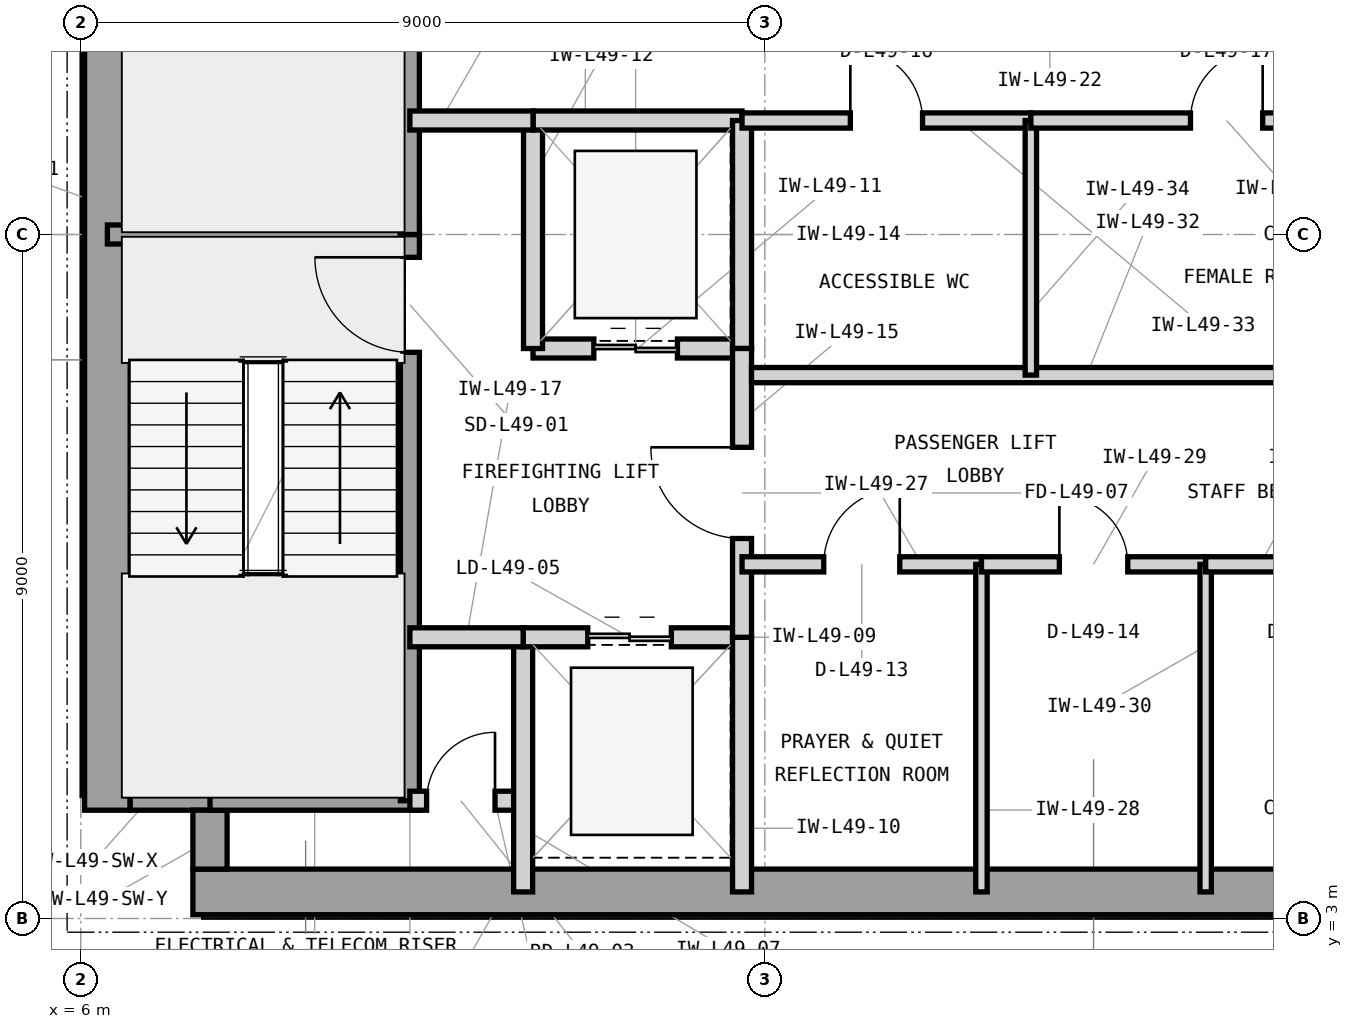
"""IFC4 building model, lengths in metres.
Left out: names, types, materials, properties, quantities, classifications, styles, units other than length and angle.
Written with IfcOpenShell. Run it as: python <this file> out.ifc"""

import sys

from ifc_helpers import new_model, si_unit, direction, frame, frame_2d, origin, place, context, subcontext, project, spatial, rectangle, extrude, element, fill, save


model = new_model("IFC4")
c1 = context("Model", 3, precision=1e-05, world=origin(), true_north=direction((0.0, 1.0)))
c2 = subcontext(c1, "Body", "Model", "MODEL_VIEW")
j1 = project(units=[si_unit("LENGTHUNIT", "METRE"), si_unit("PLANEANGLEUNIT", "RADIAN")], contexts=[c1])
p1 = place(None, origin())
s1 = spatial("IfcSite", under=j1, at=p1, CompositionType="ELEMENT")
p2 = place(p1, origin())
s2 = spatial("IfcBuilding", under=s1, at=p2, CompositionType="ELEMENT")
p3 = place(p2, frame((0.0, 0.0, 203.4)))
s3 = spatial("IfcBuildingStorey", under=s2, at=p3, CompositionType="ELEMENT", Elevation=203.4)
p4 = place(p3, frame((7.475, 3.35, 0.0), z_axis=(0.0, 0.0, 1.0), x_axis=(1.0, 0.0, 0.0)))
e1 = element("IfcWall", 1, at=p4, inside=s3, PredefinedType="SHEAR", context=c2, shape_type="SweptSolid", body=[
    extrude(rectangle(XDim=16.475, YDim=0.6, at=frame_2d((8.237, 0.0))), origin(), (0.0, 0.0, 1.0), 3.9),
])
p5 = place(p3, frame((6.35, 4.425, 0.0), z_axis=(0.0, 0.0, 1.0), x_axis=(0.0, 1.0, 0.0)))
e2 = element("IfcWall", 2, at=p5, inside=s3, PredefinedType="SHEAR", context=c2, shape_type="SweptSolid", body=[
    extrude(rectangle(XDim=15.15, YDim=0.6, at=frame_2d((7.575, 0.0))), origin(), (0.0, 0.0, 1.0), 3.9),
])
p6 = place(p3, frame((6.65, 4.65, 0.0), z_axis=(0.0, 0.0, 1.0), x_axis=(1.0, 0.0, 0.0)))
e3 = element("IfcWall", 3, at=p6, inside=s3, PredefinedType="SHEAR", context=c2, shape_type="SweptSolid", body=[
    extrude(rectangle(XDim=1.275, YDim=0.45, at=frame_2d((0.638, 0.0))), origin(), (0.0, 0.0, 1.0), 3.9),
])
p7 = place(p3, frame((7.7, 3.65, 0.0), z_axis=(0.0, 0.0, 1.0), x_axis=(0.0, 1.0, 0.0)))
e4 = element("IfcWall", 4, at=p7, inside=s3, PredefinedType="SHEAR", context=c2, shape_type="SweptSolid", body=[
    extrude(rectangle(XDim=0.775, YDim=0.45, at=frame_2d((0.388, 0.0))), origin(), (0.0, 0.0, 1.0), 3.9),
])
p8 = place(p3, frame((6.35, 12.0, 0.0), z_axis=(0.0, 0.0, 1.0), x_axis=(1.0, 0.0, 0.0)))
e5 = element("IfcWall", 5, at=p8, inside=s3, PredefinedType="SHEAR", context=c2, shape_type="SweptSolid", body=[
    extrude(rectangle(XDim=4.105, YDim=0.25, at=frame_2d((2.052, 0.0))), origin(), (0.0, 0.0, 1.0), 3.9),
])
p9 = place(p3, frame((7.7, 4.55, 0.0), z_axis=(0.0, 0.0, 1.0), x_axis=(1.0, 0.0, 0.0)))
e6 = element("IfcWall", 6, at=p9, inside=s3, PredefinedType="SHEAR", context=c2, shape_type="SweptSolid", body=[
    extrude(rectangle(XDim=2.755, YDim=0.25, at=frame_2d((1.377, 0.0))), origin(), (0.0, 0.0, 1.0), 3.9),
])
p10 = place(p3, frame((10.33, 4.55, 0.0), z_axis=(0.0, 0.0, 1.0), x_axis=(0.0, 1.0, 0.0)))
e7 = element("IfcWall", 7, at=p10, inside=s3, PredefinedType="SHEAR", context=c2, shape_type="SweptSolid", body=[
    extrude(rectangle(XDim=7.45, YDim=0.25, at=frame_2d((3.725, 0.0))), origin(), (0.0, 0.0, 1.0), 3.9),
])
p11 = place(p10, frame((5.9, 0.0, 0.0)))
e8 = element("IfcOpeningElement", 8, at=p11, cuts=e7, PredefinedType="OPENING", context=c2, shape_type="SweptSolid", body=[
    extrude(rectangle(XDim=1.25, YDim=2.2, at=frame_2d((0.625, 1.1))), frame((0.0, 0.135, 0.0), z_axis=(0.0, -1.0, 0.0), x_axis=(1.0, 0.0, 0.0)), (0.0, 0.0, 1.0), 0.27),
])
p12 = place(p3, frame((10.33, 12.0, 0.0), z_axis=(0.0, 0.0, 1.0), x_axis=(0.0, 1.0, 0.0)))
e9 = element("IfcWall", 9, at=p12, inside=s3, PredefinedType="SHEAR", context=c2, shape_type="SweptSolid", body=[
    extrude(rectangle(XDim=7.45, YDim=0.25, at=frame_2d((3.725, 0.0))), origin(), (0.0, 0.0, 1.0), 3.9),
])
p13 = place(p12, frame((5.85, 0.0, 0.0)))
e10 = element("IfcOpeningElement", 10, at=p13, cuts=e9, PredefinedType="OPENING", context=c2, shape_type="SweptSolid", body=[
    extrude(rectangle(XDim=1.25, YDim=2.2, at=frame_2d((0.625, 1.1))), frame((0.0, 0.135, 0.0), z_axis=(0.0, -1.0, 0.0), x_axis=(1.0, 0.0, 0.0)), (0.0, 0.0, 1.0), 0.27),
])
p14 = place(p3, frame((10.33, 4.55, 0.0), z_axis=(0.0, 0.0, 1.0), x_axis=(1.0, 0.0, 0.0)))
e11 = element("IfcWall", 11, at=p14, inside=s3, PredefinedType="PARTITIONING", context=c2, shape_type="SweptSolid", body=[
    extrude(rectangle(XDim=1.49, YDim=0.25, at=frame_2d((0.745, 0.0))), origin(), (0.0, 0.0, 1.0), 3.69),
])
p15 = place(p14, frame((0.22, 0.0, 0.0)))
e12 = element("IfcOpeningElement", 12, at=p15, cuts=e11, PredefinedType="OPENING", context=c2, shape_type="SweptSolid", body=[
    extrude(rectangle(XDim=0.9, YDim=2.1, at=frame_2d((0.45, 1.05))), frame((0.0, 0.135, 0.0), z_axis=(0.0, -1.0, 0.0), x_axis=(1.0, 0.0, 0.0)), (0.0, 0.0, 1.0), 0.27),
])
p16 = place(p3, frame((11.82, 3.35, 0.0), z_axis=(0.0, 0.0, 1.0), x_axis=(0.0, 1.0, 0.0)))
e13 = element("IfcWall", 13, at=p16, inside=s3, PredefinedType="PARTITIONING", context=c2, shape_type="SweptSolid", body=[
    extrude(rectangle(XDim=3.35, YDim=0.25, at=frame_2d((1.675, 0.0))), origin(), (0.0, 0.0, 1.0), 3.69),
])
p17 = place(p3, frame((11.82, 6.7, 0.0), z_axis=(0.0, 0.0, 1.0), x_axis=(1.0, 0.0, 0.0)))
e14 = element("IfcWall", 14, at=p17, inside=s3, PredefinedType="PARTITIONING", context=c2, shape_type="SweptSolid", body=[
    extrude(rectangle(XDim=2.88, YDim=0.25, at=frame_2d((1.44, 0.0))), origin(), (0.0, 0.0, 1.0), 3.283),
])
p18 = place(p17, frame((0.85, 0.0, 0.0)))
e15 = element("IfcOpeningElement", 15, at=p18, cuts=e14, PredefinedType="OPENING", context=c2, shape_type="SweptSolid", body=[
    extrude(rectangle(XDim=1.1, YDim=2.25, at=frame_2d((0.55, 1.125))), frame((0.0, 0.135, 0.0), z_axis=(0.0, -1.0, 0.0), x_axis=(1.0, 0.0, 0.0)), (0.0, 0.0, 1.0), 0.27),
])
p19 = place(p3, frame((14.7, 3.35, 0.0), z_axis=(0.0, 0.0, 1.0), x_axis=(0.0, 1.0, 0.0)))
e16 = element("IfcWall", 16, at=p19, inside=s3, PredefinedType="PARTITIONING", context=c2, shape_type="SweptSolid", body=[
    extrude(rectangle(XDim=3.35, YDim=0.25, at=frame_2d((1.675, 0.0))), origin(), (0.0, 0.0, 1.0), 3.69),
])
p20 = place(p3, frame((11.95, 10.5, 0.0), z_axis=(0.0, 0.0, 1.0), x_axis=(1.0, 0.0, 0.0)))
e17 = element("IfcWall", 17, at=p20, inside=s3, PredefinedType="PARTITIONING", context=c2, shape_type="SweptSolid", body=[
    extrude(rectangle(XDim=2.75, YDim=0.25, at=frame_2d((1.375, 0.0))), origin(), (0.0, 0.0, 1.0), 3.283),
])
p21 = place(p20, frame((0.8, 0.0, 0.0)))
e18 = element("IfcOpeningElement", 18, at=p21, cuts=e17, PredefinedType="OPENING", context=c2, shape_type="SweptSolid", body=[
    extrude(rectangle(XDim=1.1, YDim=2.25, at=frame_2d((0.55, 1.125))), frame((0.0, 0.135, 0.0), z_axis=(0.0, -1.0, 0.0), x_axis=(1.0, 0.0, 0.0)), (0.0, 0.0, 1.0), 0.27),
])
p22 = place(p3, frame((11.95, 10.5, 0.0), z_axis=(0.0, 0.0, 1.0), x_axis=(0.0, 1.0, 0.0)))
e19 = element("IfcWall", 19, at=p22, inside=s3, PredefinedType="PARTITIONING", context=c2, shape_type="SweptSolid", body=[
    extrude(rectangle(XDim=3.0, YDim=0.25, at=frame_2d((1.5, 0.0))), origin(), (0.0, 0.0, 1.0), 3.69),
])
p23 = place(p3, frame((11.95, 13.5, 0.0), z_axis=(0.0, 0.0, 1.0), x_axis=(1.0, 0.0, 0.0)))
e20 = element("IfcWall", 20, at=p23, inside=s3, PredefinedType="PARTITIONING", context=c2, shape_type="SweptSolid", body=[
    extrude(rectangle(XDim=2.75, YDim=0.25, at=frame_2d((1.375, 0.0))), origin(), (0.0, 0.0, 1.0), 3.283),
])
p24 = place(p3, frame((14.7, 10.5, 0.0), z_axis=(0.0, 0.0, 1.0), x_axis=(0.0, 1.0, 0.0)))
e21 = element("IfcWall", 21, at=p24, inside=s3, PredefinedType="PARTITIONING", context=c2, shape_type="SweptSolid", body=[
    extrude(rectangle(XDim=3.0, YDim=0.25, at=frame_2d((1.5, 0.0))), origin(), (0.0, 0.0, 1.0), 3.69),
])
p25 = place(p3, frame((14.7, 6.7, 0.0), z_axis=(0.0, 0.0, 1.0), x_axis=(0.0, 1.0, 0.0)))
e22 = element("IfcWall", 22, at=p25, inside=s3, PredefinedType="PARTITIONING", context=c2, shape_type="SweptSolid", body=[
    extrude(rectangle(XDim=3.8, YDim=0.25, at=frame_2d((1.9, 0.0))), origin(), (0.0, 0.0, 1.0), 3.69),
])
p26 = place(p25, frame((1.3, 0.0, 0.0)))
e23 = element("IfcOpeningElement", 23, at=p26, cuts=e22, PredefinedType="OPENING", context=c2, shape_type="SweptSolid", body=[
    extrude(rectangle(XDim=1.2, YDim=2.2, at=frame_2d((0.6, 1.1))), frame((0.0, 0.135, 0.0), z_axis=(0.0, -1.0, 0.0), x_axis=(1.0, 0.0, 0.0)), (0.0, 0.0, 1.0), 0.27),
])
p27 = place(p3, frame((10.33, 13.5, 0.0), z_axis=(0.0, 0.0, 1.0), x_axis=(1.0, 0.0, 0.0)))
e24 = element("IfcWall", 24, at=p27, inside=s3, PredefinedType="PARTITIONING", context=c2, shape_type="SweptSolid", body=[
    extrude(rectangle(XDim=1.62, YDim=0.25, at=frame_2d((0.81, 0.0))), origin(), (0.0, 0.0, 1.0), 3.283),
])
p28 = place(p3, frame((10.33, 6.7, 0.0), z_axis=(0.0, 0.0, 1.0), x_axis=(1.0, 0.0, 0.0)))
e25 = element("IfcWall", 25, at=p28, inside=s3, PredefinedType="PARTITIONING", context=c2, shape_type="SweptSolid", body=[
    extrude(rectangle(XDim=1.49, YDim=0.25, at=frame_2d((0.745, 0.0))), origin(), (0.0, 0.0, 1.0), 3.283),
])
p29 = place(p3, frame((14.7, 7.66, 0.0), z_axis=(0.0, 0.0, 1.0), x_axis=(1.0, 0.0, 0.0)))
e26 = element("IfcWall", 26, at=p29, inside=s3, PredefinedType="PARTITIONING", context=c2, shape_type="SweptSolid", body=[
    extrude(rectangle(XDim=3.15, YDim=0.2, at=frame_2d((1.575, 0.0))), origin(), (0.0, 0.0, 1.0), 3.69),
])
p30 = place(p29, frame((1.075, 0.0, 0.0)))
e27 = element("IfcOpeningElement", 27, at=p30, cuts=e26, PredefinedType="OPENING", context=c2, shape_type="SweptSolid", body=[
    extrude(rectangle(XDim=1.0, YDim=2.15, at=frame_2d((0.5, 1.075))), frame((0.0, 0.11, 0.0), z_axis=(0.0, -1.0, 0.0), x_axis=(1.0, 0.0, 0.0)), (0.0, 0.0, 1.0), 0.22),
])
p31 = place(p3, frame((17.85, 3.35, 0.0), z_axis=(0.0, 0.0, 1.0), x_axis=(0.0, 1.0, 0.0)))
e28 = element("IfcWall", 28, at=p31, inside=s3, PredefinedType="PARTITIONING", context=c2, shape_type="SweptSolid", body=[
    extrude(rectangle(XDim=4.31, YDim=0.15, at=frame_2d((2.155, 0.0))), origin(), (0.0, 0.0, 1.0), 3.69),
])
p32 = place(p3, frame((17.85, 7.66, 0.0), z_axis=(0.0, 0.0, 1.0), x_axis=(1.0, 0.0, 0.0)))
e29 = element("IfcWall", 29, at=p32, inside=s3, PredefinedType="PARTITIONING", context=c2, shape_type="SweptSolid", body=[
    extrude(rectangle(XDim=2.95, YDim=0.2, at=frame_2d((1.475, 0.0))), origin(), (0.0, 0.0, 1.0), 3.69),
])
p33 = place(p32, frame((1.025, 0.0, 0.0)))
e30 = element("IfcOpeningElement", 30, at=p33, cuts=e29, PredefinedType="OPENING", context=c2, shape_type="SweptSolid", body=[
    extrude(rectangle(XDim=0.9, YDim=2.1, at=frame_2d((0.45, 1.05))), frame((0.0, 0.11, 0.0), z_axis=(0.0, -1.0, 0.0), x_axis=(1.0, 0.0, 0.0)), (0.0, 0.0, 1.0), 0.22),
])
p34 = place(p3, frame((20.8, 3.35, 0.0), z_axis=(0.0, 0.0, 1.0), x_axis=(0.0, 1.0, 0.0)))
e31 = element("IfcWall", 31, at=p34, inside=s3, PredefinedType="PARTITIONING", context=c2, shape_type="SweptSolid", body=[
    extrude(rectangle(XDim=4.31, YDim=0.15, at=frame_2d((2.155, 0.0))), origin(), (0.0, 0.0, 1.0), 3.69),
])
p35 = place(p3, frame((20.8, 7.66, 0.0), z_axis=(0.0, 0.0, 1.0), x_axis=(1.0, 0.0, 0.0)))
e32 = element("IfcWall", 32, at=p35, inside=s3, PredefinedType="PARTITIONING", context=c2, shape_type="SweptSolid", body=[
    extrude(rectangle(XDim=2.85, YDim=0.2, at=frame_2d((1.425, 0.0))), origin(), (0.0, 0.0, 1.0), 3.69),
])
p36 = place(p35, frame((0.95, 0.0, 0.0)))
e33 = element("IfcOpeningElement", 33, at=p36, cuts=e32, PredefinedType="OPENING", context=c2, shape_type="SweptSolid", body=[
    extrude(rectangle(XDim=0.95, YDim=2.1, at=frame_2d((0.475, 1.05))), frame((0.0, 0.11, 0.0), z_axis=(0.0, -1.0, 0.0), x_axis=(1.0, 0.0, 0.0)), (0.0, 0.0, 1.0), 0.22),
])
p37 = place(p3, frame((14.825, 10.15, 0.0), z_axis=(0.0, 0.0, 1.0), x_axis=(1.0, 0.0, 0.0)))
e34 = element("IfcWall", 34, at=p37, inside=s3, PredefinedType="PARTITIONING", context=c2, shape_type="SweptSolid", body=[
    extrude(rectangle(XDim=8.825, YDim=0.2, at=frame_2d((4.413, 0.0))), origin(), (0.0, 0.0, 1.0), 3.69),
])
p38 = place(p3, frame((14.7, 13.5, 0.0), z_axis=(0.0, 0.0, 1.0), x_axis=(1.0, 0.0, 0.0)))
e35 = element("IfcWall", 35, at=p38, inside=s3, PredefinedType="PARTITIONING", context=c2, shape_type="SweptSolid", body=[
    extrude(rectangle(XDim=3.8, YDim=0.2, at=frame_2d((1.9, 0.0))), origin(), (0.0, 0.0, 1.0), 3.283),
])
p39 = place(p38, frame((1.425, 0.0, 0.0)))
e36 = element("IfcOpeningElement", 36, at=p39, cuts=e35, PredefinedType="OPENING", context=c2, shape_type="SweptSolid", body=[
    extrude(rectangle(XDim=0.95, YDim=2.1, at=frame_2d((0.475, 1.05))), frame((0.0, 0.11, 0.0), z_axis=(0.0, -1.0, 0.0), x_axis=(1.0, 0.0, 0.0)), (0.0, 0.0, 1.0), 0.22),
])
p40 = place(p3, frame((18.5, 10.15, 0.0), z_axis=(0.0, 0.0, 1.0), x_axis=(0.0, 1.0, 0.0)))
e37 = element("IfcWall", 37, at=p40, inside=s3, PredefinedType="PARTITIONING", context=c2, shape_type="SweptSolid", body=[
    extrude(rectangle(XDim=3.35, YDim=0.15, at=frame_2d((1.675, 0.0))), origin(), (0.0, 0.0, 1.0), 3.69),
])
p41 = place(p3, frame((18.5, 13.5, 0.0), z_axis=(0.0, 0.0, 1.0), x_axis=(1.0, 0.0, 0.0)))
e38 = element("IfcWall", 38, at=p41, inside=s3, PredefinedType="PARTITIONING", context=c2, shape_type="SweptSolid", body=[
    extrude(rectangle(XDim=5.15, YDim=0.2, at=frame_2d((2.575, 0.0))), origin(), (0.0, 0.0, 1.0), 3.283),
])
p42 = place(p41, frame((2.1, 0.0, 0.0)))
e39 = element("IfcOpeningElement", 39, at=p42, cuts=e38, PredefinedType="OPENING", context=c2, shape_type="SweptSolid", body=[
    extrude(rectangle(XDim=0.95, YDim=2.1, at=frame_2d((0.475, 1.05))), frame((0.0, 0.11, 0.0), z_axis=(0.0, -1.0, 0.0), x_axis=(1.0, 0.0, 0.0)), (0.0, 0.0, 1.0), 0.22),
])
p43 = place(p11, origin())
e40 = element("IfcDoor", 40, at=p43, inside=s3, OperationType="SINGLE_SWING_RIGHT", PredefinedType="DOOR", context=c2, shape_type="SweptSolid", body=[
    extrude(rectangle(XDim=1.25, YDim=2.2, at=frame_2d((0.625, 1.1))), frame((0.0, 0.025, 0.0), z_axis=(0.0, -1.0, 0.0), x_axis=(1.0, 0.0, 0.0)), (0.0, 0.0, 1.0), 0.05),
])
fill(e8, e40)
p44 = place(p15, origin())
e41 = element("IfcDoor", 41, at=p44, inside=s3, OperationType="SINGLE_SWING_RIGHT", PredefinedType="TRAPDOOR", context=c2, shape_type="SweptSolid", body=[
    extrude(rectangle(XDim=0.9, YDim=2.1, at=frame_2d((0.45, 1.05))), frame((0.0, 0.025, 0.0), z_axis=(0.0, -1.0, 0.0), x_axis=(1.0, 0.0, 0.0)), (0.0, 0.0, 1.0), 0.05),
])
fill(e12, e41)
p45 = place(p18, origin())
e42 = element("IfcDoor", 42, at=p45, inside=s3, OperationType="DOUBLE_DOOR_SLIDING", PredefinedType="DOOR", context=c2, shape_type="SweptSolid", body=[
    extrude(rectangle(XDim=1.1, YDim=2.25, at=frame_2d((0.55, 1.125))), frame((0.0, 0.025, 0.0), z_axis=(0.0, -1.0, 0.0), x_axis=(1.0, 0.0, 0.0)), (0.0, 0.0, 1.0), 0.05),
])
fill(e15, e42)
p46 = place(p21, origin())
e43 = element("IfcDoor", 43, at=p46, inside=s3, OperationType="DOUBLE_DOOR_SLIDING", PredefinedType="DOOR", context=c2, shape_type="SweptSolid", body=[
    extrude(rectangle(XDim=1.1, YDim=2.25, at=frame_2d((0.55, 1.125))), frame((0.0, 0.025, 0.0), z_axis=(0.0, -1.0, 0.0), x_axis=(1.0, 0.0, 0.0)), (0.0, 0.0, 1.0), 0.05),
])
fill(e18, e43)
p47 = place(p26, origin())
e44 = element("IfcDoor", 44, at=p47, inside=s3, OperationType="SINGLE_SWING_RIGHT", PredefinedType="DOOR", context=c2, shape_type="SweptSolid", body=[
    extrude(rectangle(XDim=1.2, YDim=2.2, at=frame_2d((0.6, 1.1))), frame((0.0, 0.025, 0.0), z_axis=(0.0, -1.0, 0.0), x_axis=(1.0, 0.0, 0.0)), (0.0, 0.0, 1.0), 0.05),
])
fill(e23, e44)
p48 = place(p30, origin())
e45 = element("IfcDoor", 45, at=p48, inside=s3, OperationType="SINGLE_SWING_RIGHT", PredefinedType="DOOR", context=c2, shape_type="SweptSolid", body=[
    extrude(rectangle(XDim=1.0, YDim=2.15, at=frame_2d((0.5, 1.075))), frame((0.0, 0.025, 0.0), z_axis=(0.0, -1.0, 0.0), x_axis=(1.0, 0.0, 0.0)), (0.0, 0.0, 1.0), 0.05),
])
fill(e27, e45)
p49 = place(p33, origin())
e46 = element("IfcDoor", 46, at=p49, inside=s3, OperationType="SINGLE_SWING_LEFT", PredefinedType="TRAPDOOR", context=c2, shape_type="SweptSolid", body=[
    extrude(rectangle(XDim=0.9, YDim=2.1, at=frame_2d((0.45, 1.05))), frame((0.0, 0.025, 0.0), z_axis=(0.0, -1.0, 0.0), x_axis=(1.0, 0.0, 0.0)), (0.0, 0.0, 1.0), 0.05),
])
fill(e30, e46)
p50 = place(p39, origin())
e47 = element("IfcDoor", 47, at=p50, inside=s3, OperationType="SINGLE_SWING_LEFT", PredefinedType="DOOR", context=c2, shape_type="SweptSolid", body=[
    extrude(rectangle(XDim=0.95, YDim=2.1, at=frame_2d((0.475, 1.05))), frame((0.0, 0.025, 0.0), z_axis=(0.0, -1.0, 0.0), x_axis=(1.0, 0.0, 0.0)), (0.0, 0.0, 1.0), 0.05),
])
fill(e36, e47)
p51 = place(p42, origin())
e48 = element("IfcDoor", 48, at=p51, inside=s3, OperationType="SINGLE_SWING_RIGHT", PredefinedType="DOOR", context=c2, shape_type="SweptSolid", body=[
    extrude(rectangle(XDim=0.95, YDim=2.1, at=frame_2d((0.475, 1.05))), frame((0.0, 0.025, 0.0), z_axis=(0.0, -1.0, 0.0), x_axis=(1.0, 0.0, 0.0)), (0.0, 0.0, 1.0), 0.05),
])
fill(e39, e48)
save(model, sys.argv[1])
